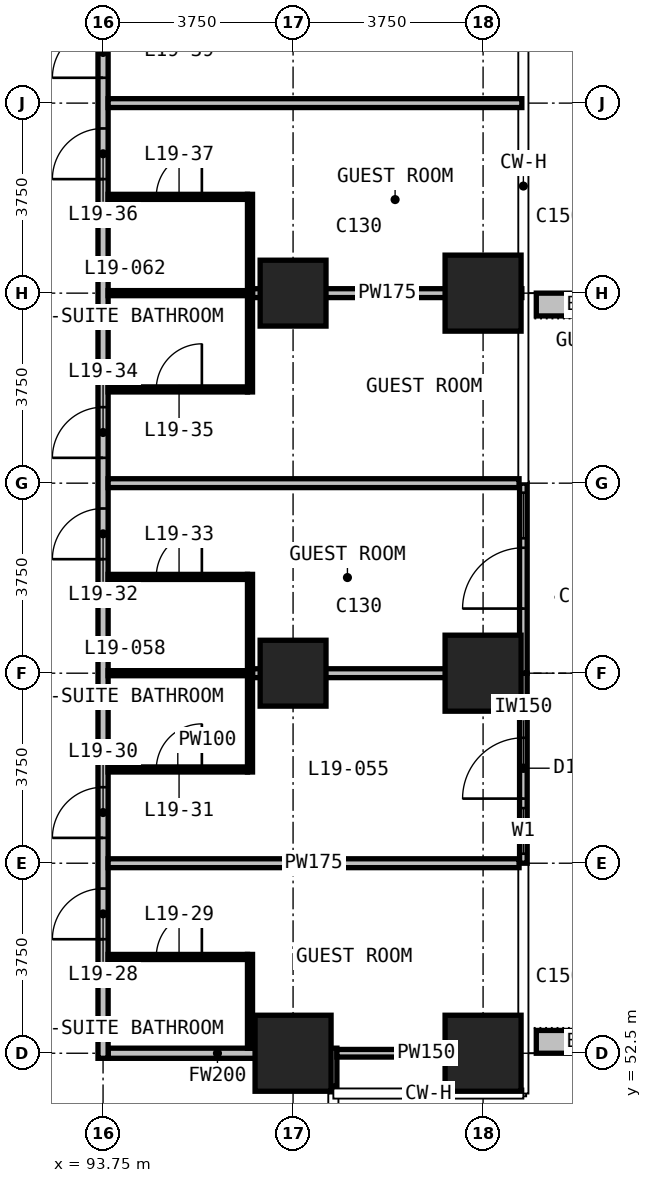
"""IFC4 building model, lengths in metres.
Left out: names, types, materials, properties, quantities, classifications, styles, units other than length and angle.
Written with IfcOpenShell. Run it as: python <this file> out.ifc"""

import sys

from ifc_helpers import new_model, si_unit, direction, frame, frame_2d, origin, origin_2d, place, context, subcontext, project, spatial, rectangle, extrude, element, fill, save


model = new_model("IFC4")
c1 = context("Model", 3, precision=1e-05, world=origin(), true_north=direction((0.0, 1.0)))
c2 = subcontext(c1, "Body", "Model", "MODEL_VIEW")
j1 = project(units=[si_unit("LENGTHUNIT", "METRE"), si_unit("PLANEANGLEUNIT", "RADIAN")], contexts=[c1])
p1 = place(None, origin())
s1 = spatial("IfcSite", under=j1, at=p1, CompositionType="ELEMENT")
p2 = place(p1, origin())
s2 = spatial("IfcBuilding", under=s1, at=p2, CompositionType="ELEMENT")
p3 = place(p2, frame((0.0, 0.0, 82.4)))
s3 = spatial("IfcBuildingStorey", under=s2, at=p3, CompositionType="ELEMENT", Elevation=82.4)
p4 = place(p3, frame((97.5, 52.5, 0.0), z_axis=(0.0, 0.0, 1.0), x_axis=(1.0, 0.0, 0.0)))
e1 = element("IfcColumn", 1, at=p4, inside=s3, PredefinedType="COLUMN", context=c2, shape_type="SweptSolid", body=[
    extrude(rectangle(XDim=1.5, YDim=1.5, at=origin_2d()), origin(), (0.0, 0.0, 1.0), 3.3),
])
for number, where, z_axis, x_axis in (
    (2, (97.5, 60.0, 0.0), (0.0, 0.0, 1.0), (1.0, 0.0, 0.0)),
    (3, (97.5, 67.5, 0.0), (0.0, 0.0, 1.0), (1.0, 0.0, 0.0)),
):
    element("IfcColumn", number, at=place(p3, frame(where, z_axis=z_axis, x_axis=x_axis)), inside=s3, PredefinedType="COLUMN", context=c2, shape_type="SweptSolid", body=[
        extrude(rectangle(XDim=1.3, YDim=1.3, at=origin_2d()), origin(), (0.0, 0.0, 1.0), 3.3),
    ])
for number, where, z_axis, x_axis in (
    (4, (101.25, 52.5, 0.0), (0.0, 0.0, 1.0), (1.0, 0.0, 0.0)),
    (5, (101.25, 60.0, 0.0), (0.0, 0.0, 1.0), (1.0, 0.0, 0.0)),
    (6, (101.25, 67.5, 0.0), (0.0, 0.0, 1.0), (1.0, 0.0, 0.0)),
):
    element("IfcColumn", number, at=place(p3, frame(where, z_axis=z_axis, x_axis=x_axis)), inside=s3, PredefinedType="COLUMN", context=c2, shape_type="SweptSolid", body=[
        extrude(rectangle(XDim=1.5, YDim=1.5, at=origin_2d()), origin(), (0.0, 0.0, 1.0), 3.3),
    ])
p5 = place(p3, frame((102.045, 56.25, 0.0), z_axis=(0.0, 0.0, 1.0), x_axis=(0.0, 1.0, 0.0)))
e7 = element("IfcWall", 7, at=p5, inside=s3, PredefinedType="SOLIDWALL", context=c2, shape_type="SweptSolid", body=[
    extrude(rectangle(XDim=3.75, YDim=0.15, at=frame_2d((1.875, 0.0))), origin(), (0.0, 0.0, 1.0), 3.0),
])
p6 = place(p5, frame((0.188, 0.0, 0.1)))
e8 = element("IfcOpeningElement", 8, at=p6, cuts=e7, PredefinedType="OPENING", context=c2, shape_type="SweptSolid", body=[
    extrude(rectangle(XDim=0.9, YDim=2.4, at=frame_2d((0.45, 1.2))), frame((0.0, 0.085, 0.0), z_axis=(0.0, -1.0, 0.0), x_axis=(1.0, 0.0, 0.0)), (0.0, 0.0, 1.0), 0.17),
])
p7 = place(p5, frame((1.275, 0.0, 0.0)))
e9 = element("IfcOpeningElement", 9, at=p7, cuts=e7, PredefinedType="OPENING", context=c2, shape_type="SweptSolid", body=[
    extrude(rectangle(XDim=1.2, YDim=2.4, at=frame_2d((0.6, 1.2))), frame((0.0, 0.085, 0.0), z_axis=(0.0, -1.0, 0.0), x_axis=(1.0, 0.0, 0.0)), (0.0, 0.0, 1.0), 0.17),
])
p8 = place(p3, frame((102.045, 60.0, 0.0), z_axis=(0.0, 0.0, 1.0), x_axis=(0.0, 1.0, 0.0)))
e10 = element("IfcWall", 10, at=p8, inside=s3, PredefinedType="SOLIDWALL", context=c2, shape_type="SweptSolid", body=[
    extrude(rectangle(XDim=3.75, YDim=0.15, at=frame_2d((1.875, 0.0))), origin(), (0.0, 0.0, 1.0), 3.0),
])
p9 = place(p8, frame((1.275, 0.0, 0.0)))
e11 = element("IfcOpeningElement", 11, at=p9, cuts=e10, PredefinedType="OPENING", context=c2, shape_type="SweptSolid", body=[
    extrude(rectangle(XDim=1.2, YDim=2.4, at=frame_2d((0.6, 1.2))), frame((0.0, 0.085, 0.0), z_axis=(0.0, -1.0, 0.0), x_axis=(1.0, 0.0, 0.0)), (0.0, 0.0, 1.0), 0.17),
])
p10 = place(p8, frame((2.663, 0.0, 0.1)))
e12 = element("IfcOpeningElement", 12, at=p10, cuts=e10, PredefinedType="OPENING", context=c2, shape_type="SweptSolid", body=[
    extrude(rectangle(XDim=0.9, YDim=2.4, at=frame_2d((0.45, 1.2))), frame((0.0, 0.085, 0.0), z_axis=(0.0, -1.0, 0.0), x_axis=(1.0, 0.0, 0.0)), (0.0, 0.0, 1.0), 0.17),
])
for number, where, z_axis, x_axis in (
    (13, (102.3, 52.725, 0.0), (0.0, 0.0, 1.0), (1.0, 0.0, 0.0)),
    (14, (102.3, 67.275, 0.0), (0.0, 0.0, 1.0), (1.0, 0.0, 0.0)),
):
    element("IfcWall", number, at=place(p3, frame(where, z_axis=z_axis, x_axis=x_axis)), inside=s3, PredefinedType="USERDEFINED", context=c2, shape_type="SweptSolid", body=[
        extrude(rectangle(XDim=2.35, YDim=0.45, at=frame_2d((1.175, 0.0))), origin(), (0.0, 0.0, 1.0), 1.1),
    ])
p11 = place(p3, frame((93.85, 52.5, 0.0), z_axis=(0.0, 0.0, 1.0), x_axis=(1.0, 0.0, 0.0)))
e15 = element("IfcWall", 15, at=p11, inside=s3, PredefinedType="PARTITIONING", context=c2, shape_type="SweptSolid", body=[
    extrude(rectangle(XDim=4.315, YDim=0.2, at=frame_2d((2.157, 0.0))), origin(), (0.0, 0.0, 1.0), 3.0),
])
p12 = place(p3, frame((93.75, 52.4, 0.0), z_axis=(0.0, 0.0, 1.0), x_axis=(0.0, 1.0, 0.0)))
e16 = element("IfcWall", 16, at=p12, inside=s3, PredefinedType="PARTITIONING", context=c2, shape_type="SweptSolid", body=[
    extrude(rectangle(XDim=33.925, YDim=0.2, at=frame_2d((16.962, 0.0))), origin(), (0.0, 0.0, 1.0), 3.0),
])
p13 = place(p12, frame((2.35, 0.0, 0.0)))
e17 = element("IfcOpeningElement", 17, at=p13, cuts=e16, PredefinedType="OPENING", context=c2, shape_type="SweptSolid", body=[
    extrude(rectangle(XDim=1.0, YDim=2.2, at=frame_2d((0.5, 1.1))), frame((0.0, 0.11, 0.0), z_axis=(0.0, -1.0, 0.0), x_axis=(1.0, 0.0, 0.0)), (0.0, 0.0, 1.0), 0.22),
])
p14 = place(p12, frame((4.35, 0.0, 0.0)))
e18 = element("IfcOpeningElement", 18, at=p14, cuts=e16, PredefinedType="OPENING", context=c2, shape_type="SweptSolid", body=[
    extrude(rectangle(XDim=1.0, YDim=2.2, at=frame_2d((0.5, 1.1))), frame((0.0, 0.11, 0.0), z_axis=(0.0, -1.0, 0.0), x_axis=(1.0, 0.0, 0.0)), (0.0, 0.0, 1.0), 0.22),
])
p15 = place(p12, frame((9.85, 0.0, 0.0)))
e19 = element("IfcOpeningElement", 19, at=p15, cuts=e16, PredefinedType="OPENING", context=c2, shape_type="SweptSolid", body=[
    extrude(rectangle(XDim=1.0, YDim=2.2, at=frame_2d((0.5, 1.1))), frame((0.0, 0.11, 0.0), z_axis=(0.0, -1.0, 0.0), x_axis=(1.0, 0.0, 0.0)), (0.0, 0.0, 1.0), 0.22),
])
p16 = place(p12, frame((11.85, 0.0, 0.0)))
e20 = element("IfcOpeningElement", 20, at=p16, cuts=e16, PredefinedType="OPENING", context=c2, shape_type="SweptSolid", body=[
    extrude(rectangle(XDim=1.0, YDim=2.2, at=frame_2d((0.5, 1.1))), frame((0.0, 0.11, 0.0), z_axis=(0.0, -1.0, 0.0), x_axis=(1.0, 0.0, 0.0)), (0.0, 0.0, 1.0), 0.22),
])
p17 = place(p12, frame((17.35, 0.0, 0.0)))
e21 = element("IfcOpeningElement", 21, at=p17, cuts=e16, PredefinedType="OPENING", context=c2, shape_type="SweptSolid", body=[
    extrude(rectangle(XDim=1.0, YDim=2.2, at=frame_2d((0.5, 1.1))), frame((0.0, 0.11, 0.0), z_axis=(0.0, -1.0, 0.0), x_axis=(1.0, 0.0, 0.0)), (0.0, 0.0, 1.0), 0.22),
])
p18 = place(p12, frame((19.35, 0.0, 0.0)))
e22 = element("IfcOpeningElement", 22, at=p18, cuts=e16, PredefinedType="OPENING", context=c2, shape_type="SweptSolid", body=[
    extrude(rectangle(XDim=1.0, YDim=2.2, at=frame_2d((0.5, 1.1))), frame((0.0, 0.11, 0.0), z_axis=(0.0, -1.0, 0.0), x_axis=(1.0, 0.0, 0.0)), (0.0, 0.0, 1.0), 0.22),
])
p19 = place(p12, frame((24.85, 0.0, 0.0)))
e23 = element("IfcOpeningElement", 23, at=p19, cuts=e16, PredefinedType="OPENING", context=c2, shape_type="SweptSolid", body=[
    extrude(rectangle(XDim=1.0, YDim=2.2, at=frame_2d((0.5, 1.1))), frame((0.0, 0.11, 0.0), z_axis=(0.0, -1.0, 0.0), x_axis=(1.0, 0.0, 0.0)), (0.0, 0.0, 1.0), 0.22),
])
p20 = place(p12, frame((26.85, 0.0, 0.0)))
e24 = element("IfcOpeningElement", 24, at=p20, cuts=e16, PredefinedType="OPENING", context=c2, shape_type="SweptSolid", body=[
    extrude(rectangle(XDim=1.0, YDim=2.2, at=frame_2d((0.5, 1.1))), frame((0.0, 0.11, 0.0), z_axis=(0.0, -1.0, 0.0), x_axis=(1.0, 0.0, 0.0)), (0.0, 0.0, 1.0), 0.22),
])
p21 = place(p12, frame((31.55, 0.0, 0.0)))
e25 = element("IfcOpeningElement", 25, at=p21, cuts=e16, PredefinedType="OPENING", context=c2, shape_type="SweptSolid", body=[
    extrude(rectangle(XDim=0.9, YDim=2.2, at=frame_2d((0.45, 1.1))), frame((0.0, 0.11, 0.0), z_axis=(0.0, -1.0, 0.0), x_axis=(1.0, 0.0, 0.0)), (0.0, 0.0, 1.0), 0.22),
])
p22 = place(p3, frame((98.265, 51.855, 0.0), z_axis=(0.0, 0.0, 1.0), x_axis=(0.0, 1.0, 0.0)))
e26 = element("IfcWall", 26, at=p22, inside=s3, PredefinedType="PARTITIONING", context=c2, shape_type="SweptSolid", body=[
    extrude(rectangle(XDim=0.745, YDim=0.2, at=frame_2d((0.373, 0.0))), origin(), (0.0, 0.0, 1.0), 3.0),
])
p23 = place(p3, frame((93.85, 56.25, 0.0), z_axis=(0.0, 0.0, 1.0), x_axis=(1.0, 0.0, 0.0)))
e27 = element("IfcWall", 27, at=p23, inside=s3, PredefinedType="PARTITIONING", context=c2, shape_type="SweptSolid", body=[
    extrude(rectangle(XDim=8.11, YDim=0.175, at=frame_2d((4.055, 0.0))), origin(), (0.0, 0.0, 1.0), 3.0),
])
p24 = place(p3, frame((96.7, 60.0, 0.0), z_axis=(0.0, 0.0, 1.0), x_axis=(1.0, 0.0, 0.0)))
e28 = element("IfcWall", 28, at=p24, inside=s3, PredefinedType="PARTITIONING", context=c2, shape_type="SweptSolid", body=[
    extrude(rectangle(XDim=5.26, YDim=0.175, at=frame_2d((2.63, 0.0))), origin(), (0.0, 0.0, 1.0), 3.0),
])
p25 = place(p3, frame((93.85, 63.75, 0.0), z_axis=(0.0, 0.0, 1.0), x_axis=(1.0, 0.0, 0.0)))
e29 = element("IfcWall", 29, at=p25, inside=s3, PredefinedType="PARTITIONING", context=c2, shape_type="SweptSolid", body=[
    extrude(rectangle(XDim=8.11, YDim=0.175, at=frame_2d((4.055, 0.0))), origin(), (0.0, 0.0, 1.0), 3.0),
])
p26 = place(p3, frame((96.7, 67.5, 0.0), z_axis=(0.0, 0.0, 1.0), x_axis=(1.0, 0.0, 0.0)))
e30 = element("IfcWall", 30, at=p26, inside=s3, PredefinedType="PARTITIONING", context=c2, shape_type="SweptSolid", body=[
    extrude(rectangle(XDim=5.315, YDim=0.175, at=frame_2d((2.657, 0.0))), origin(), (0.0, 0.0, 1.0), 3.0),
])
p27 = place(p3, frame((93.85, 71.25, 0.0), z_axis=(0.0, 0.0, 1.0), x_axis=(1.0, 0.0, 0.0)))
e31 = element("IfcWall", 31, at=p27, inside=s3, PredefinedType="PARTITIONING", context=c2, shape_type="SweptSolid", body=[
    extrude(rectangle(XDim=8.165, YDim=0.175, at=frame_2d((4.083, 0.0))), origin(), (0.0, 0.0, 1.0), 3.0),
])
p28 = place(p3, frame((98.365, 52.5, 0.0), z_axis=(0.0, 0.0, 1.0), x_axis=(1.0, 0.0, 0.0)))
e32 = element("IfcWall", 32, at=p28, inside=s3, PredefinedType="PARTITIONING", context=c2, shape_type="SweptSolid", body=[
    extrude(rectangle(XDim=3.53, YDim=0.15, at=frame_2d((1.765, 0.0))), origin(), (0.0, 0.0, 1.0), 3.0),
])
p29 = place(p3, frame((93.85, 54.4, 0.0), z_axis=(0.0, 0.0, 1.0), x_axis=(1.0, 0.0, 0.0)))
e33 = element("IfcWall", 33, at=p29, inside=s3, PredefinedType="PARTITIONING", context=c2, shape_type="SweptSolid", body=[
    extrude(rectangle(XDim=2.75, YDim=0.1, at=frame_2d((1.375, 0.0))), origin(), (0.0, 0.0, 1.0), 3.0),
])
p30 = place(p29, frame((0.95, 0.0, 0.0)))
e34 = element("IfcOpeningElement", 34, at=p30, cuts=e33, PredefinedType="OPENING", context=c2, shape_type="SweptSolid", body=[
    extrude(rectangle(XDim=0.9, YDim=2.2, at=frame_2d((0.45, 1.1))), frame((0.0, 0.06, 0.0), z_axis=(0.0, -1.0, 0.0), x_axis=(1.0, 0.0, 0.0)), (0.0, 0.0, 1.0), 0.12),
])
p31 = place(p3, frame((93.85, 58.1, 0.0), z_axis=(0.0, 0.0, 1.0), x_axis=(1.0, 0.0, 0.0)))
e35 = element("IfcWall", 35, at=p31, inside=s3, PredefinedType="PARTITIONING", context=c2, shape_type="SweptSolid", body=[
    extrude(rectangle(XDim=2.75, YDim=0.1, at=frame_2d((1.375, 0.0))), origin(), (0.0, 0.0, 1.0), 3.0),
])
p32 = place(p31, frame((0.95, 0.0, 0.0)))
e36 = element("IfcOpeningElement", 36, at=p32, cuts=e35, PredefinedType="OPENING", context=c2, shape_type="SweptSolid", body=[
    extrude(rectangle(XDim=0.9, YDim=2.2, at=frame_2d((0.45, 1.1))), frame((0.0, 0.06, 0.0), z_axis=(0.0, -1.0, 0.0), x_axis=(1.0, 0.0, 0.0)), (0.0, 0.0, 1.0), 0.12),
])
p33 = place(p3, frame((93.85, 60.0, 0.0), z_axis=(0.0, 0.0, 1.0), x_axis=(1.0, 0.0, 0.0)))
e37 = element("IfcWall", 37, at=p33, inside=s3, PredefinedType="PARTITIONING", context=c2, shape_type="SweptSolid", body=[
    extrude(rectangle(XDim=2.75, YDim=0.1, at=frame_2d((1.375, 0.0))), origin(), (0.0, 0.0, 1.0), 3.0),
])
p34 = place(p3, frame((93.85, 61.9, 0.0), z_axis=(0.0, 0.0, 1.0), x_axis=(1.0, 0.0, 0.0)))
e38 = element("IfcWall", 38, at=p34, inside=s3, PredefinedType="PARTITIONING", context=c2, shape_type="SweptSolid", body=[
    extrude(rectangle(XDim=2.75, YDim=0.1, at=frame_2d((1.375, 0.0))), origin(), (0.0, 0.0, 1.0), 3.0),
])
p35 = place(p34, frame((0.95, 0.0, 0.0)))
e39 = element("IfcOpeningElement", 39, at=p35, cuts=e38, PredefinedType="OPENING", context=c2, shape_type="SweptSolid", body=[
    extrude(rectangle(XDim=0.9, YDim=2.2, at=frame_2d((0.45, 1.1))), frame((0.0, 0.06, 0.0), z_axis=(0.0, -1.0, 0.0), x_axis=(1.0, 0.0, 0.0)), (0.0, 0.0, 1.0), 0.12),
])
p36 = place(p3, frame((93.85, 65.6, 0.0), z_axis=(0.0, 0.0, 1.0), x_axis=(1.0, 0.0, 0.0)))
e40 = element("IfcWall", 40, at=p36, inside=s3, PredefinedType="PARTITIONING", context=c2, shape_type="SweptSolid", body=[
    extrude(rectangle(XDim=2.75, YDim=0.1, at=frame_2d((1.375, 0.0))), origin(), (0.0, 0.0, 1.0), 3.0),
])
p37 = place(p36, frame((0.95, 0.0, 0.0)))
e41 = element("IfcOpeningElement", 41, at=p37, cuts=e40, PredefinedType="OPENING", context=c2, shape_type="SweptSolid", body=[
    extrude(rectangle(XDim=0.9, YDim=2.2, at=frame_2d((0.45, 1.1))), frame((0.0, 0.06, 0.0), z_axis=(0.0, -1.0, 0.0), x_axis=(1.0, 0.0, 0.0)), (0.0, 0.0, 1.0), 0.12),
])
p38 = place(p3, frame((93.85, 67.5, 0.0), z_axis=(0.0, 0.0, 1.0), x_axis=(1.0, 0.0, 0.0)))
e42 = element("IfcWall", 42, at=p38, inside=s3, PredefinedType="PARTITIONING", context=c2, shape_type="SweptSolid", body=[
    extrude(rectangle(XDim=2.75, YDim=0.1, at=frame_2d((1.375, 0.0))), origin(), (0.0, 0.0, 1.0), 3.0),
])
p39 = place(p3, frame((93.85, 69.4, 0.0), z_axis=(0.0, 0.0, 1.0), x_axis=(1.0, 0.0, 0.0)))
e43 = element("IfcWall", 43, at=p39, inside=s3, PredefinedType="PARTITIONING", context=c2, shape_type="SweptSolid", body=[
    extrude(rectangle(XDim=2.75, YDim=0.1, at=frame_2d((1.375, 0.0))), origin(), (0.0, 0.0, 1.0), 3.0),
])
p40 = place(p39, frame((0.95, 0.0, 0.0)))
e44 = element("IfcOpeningElement", 44, at=p40, cuts=e43, PredefinedType="OPENING", context=c2, shape_type="SweptSolid", body=[
    extrude(rectangle(XDim=0.9, YDim=2.2, at=frame_2d((0.45, 1.1))), frame((0.0, 0.06, 0.0), z_axis=(0.0, -1.0, 0.0), x_axis=(1.0, 0.0, 0.0)), (0.0, 0.0, 1.0), 0.12),
])
p41 = place(p3, frame((96.65, 52.6, 0.0), z_axis=(0.0, 0.0, 1.0), x_axis=(0.0, 1.0, 0.0)))
e45 = element("IfcWall", 45, at=p41, inside=s3, PredefinedType="PARTITIONING", context=c2, shape_type="SweptSolid", body=[
    extrude(rectangle(XDim=1.85, YDim=0.1, at=frame_2d((0.925, 0.0))), origin(), (0.0, 0.0, 1.0), 3.0),
])
for number, where, z_axis, x_axis in (
    (46, (96.65, 58.05, 0.0), (0.0, 0.0, 1.0), (0.0, 1.0, 0.0)),
    (47, (96.65, 65.55, 0.0), (0.0, 0.0, 1.0), (0.0, 1.0, 0.0)),
):
    element("IfcWall", number, at=place(p3, frame(where, z_axis=z_axis, x_axis=x_axis)), inside=s3, PredefinedType="PARTITIONING", context=c2, shape_type="SweptSolid", body=[
        extrude(rectangle(XDim=3.9, YDim=0.1, at=frame_2d((1.95, 0.0))), origin(), (0.0, 0.0, 1.0), 3.0),
    ])
p42 = place(p6, origin())
e48 = element("IfcWindow", 48, at=p42, inside=s3, PartitioningType="SINGLE_PANEL", PredefinedType="WINDOW", context=c2, shape_type="SweptSolid", body=[
    extrude(rectangle(XDim=0.9, YDim=2.4, at=frame_2d((0.45, 1.2))), frame((0.0, 0.03, 0.0), z_axis=(0.0, -1.0, 0.0), x_axis=(1.0, 0.0, 0.0)), (0.0, 0.0, 1.0), 0.06),
])
fill(e8, e48)
p43 = place(p7, origin())
e49 = element("IfcDoor", 49, at=p43, inside=s3, OperationType="SINGLE_SWING_LEFT", PredefinedType="DOOR", context=c2, shape_type="SweptSolid", body=[
    extrude(rectangle(XDim=1.2, YDim=2.4, at=frame_2d((0.6, 1.2))), frame((0.0, 0.025, 0.0), z_axis=(0.0, -1.0, 0.0), x_axis=(1.0, 0.0, 0.0)), (0.0, 0.0, 1.0), 0.05),
])
fill(e9, e49)
p44 = place(p9, origin())
e50 = element("IfcDoor", 50, at=p44, inside=s3, OperationType="SINGLE_SWING_LEFT", PredefinedType="DOOR", context=c2, shape_type="SweptSolid", body=[
    extrude(rectangle(XDim=1.2, YDim=2.4, at=frame_2d((0.6, 1.2))), frame((0.0, 0.025, 0.0), z_axis=(0.0, -1.0, 0.0), x_axis=(1.0, 0.0, 0.0)), (0.0, 0.0, 1.0), 0.05),
])
fill(e11, e50)
p45 = place(p10, origin())
e51 = element("IfcWindow", 51, at=p45, inside=s3, PartitioningType="SINGLE_PANEL", PredefinedType="WINDOW", context=c2, shape_type="SweptSolid", body=[
    extrude(rectangle(XDim=0.9, YDim=2.4, at=frame_2d((0.45, 1.2))), frame((0.0, 0.03, 0.0), z_axis=(0.0, -1.0, 0.0), x_axis=(1.0, 0.0, 0.0)), (0.0, 0.0, 1.0), 0.06),
])
fill(e12, e51)
p46 = place(p13, origin())
e52 = element("IfcDoor", 52, at=p46, inside=s3, OperationType="SINGLE_SWING_LEFT", PredefinedType="DOOR", context=c2, shape_type="SweptSolid", body=[
    extrude(rectangle(XDim=1.0, YDim=2.2, at=frame_2d((0.5, 1.1))), frame((0.0, 0.025, 0.0), z_axis=(0.0, -1.0, 0.0), x_axis=(1.0, 0.0, 0.0)), (0.0, 0.0, 1.0), 0.05),
])
fill(e17, e52)
p47 = place(p30, origin())
e53 = element("IfcDoor", 53, at=p47, inside=s3, OperationType="SINGLE_SWING_RIGHT", PredefinedType="DOOR", context=c2, shape_type="SweptSolid", body=[
    extrude(rectangle(XDim=0.9, YDim=2.2, at=frame_2d((0.45, 1.1))), frame((0.0, 0.025, 0.0), z_axis=(0.0, -1.0, 0.0), x_axis=(1.0, 0.0, 0.0)), (0.0, 0.0, 1.0), 0.05),
])
fill(e34, e53)
p48 = place(p14, origin())
e54 = element("IfcDoor", 54, at=p48, inside=s3, OperationType="SINGLE_SWING_LEFT", PredefinedType="DOOR", context=c2, shape_type="SweptSolid", body=[
    extrude(rectangle(XDim=1.0, YDim=2.2, at=frame_2d((0.5, 1.1))), frame((0.0, 0.025, 0.0), z_axis=(0.0, -1.0, 0.0), x_axis=(1.0, 0.0, 0.0)), (0.0, 0.0, 1.0), 0.05),
])
fill(e18, e54)
p49 = place(p32, origin())
e55 = element("IfcDoor", 55, at=p49, inside=s3, OperationType="SINGLE_SWING_RIGHT", PredefinedType="DOOR", context=c2, shape_type="SweptSolid", body=[
    extrude(rectangle(XDim=0.9, YDim=2.2, at=frame_2d((0.45, 1.1))), frame((0.0, 0.025, 0.0), z_axis=(0.0, -1.0, 0.0), x_axis=(1.0, 0.0, 0.0)), (0.0, 0.0, 1.0), 0.05),
])
fill(e36, e55)
p50 = place(p15, origin())
e56 = element("IfcDoor", 56, at=p50, inside=s3, OperationType="SINGLE_SWING_LEFT", PredefinedType="DOOR", context=c2, shape_type="SweptSolid", body=[
    extrude(rectangle(XDim=1.0, YDim=2.2, at=frame_2d((0.5, 1.1))), frame((0.0, 0.025, 0.0), z_axis=(0.0, -1.0, 0.0), x_axis=(1.0, 0.0, 0.0)), (0.0, 0.0, 1.0), 0.05),
])
fill(e19, e56)
p51 = place(p35, origin())
e57 = element("IfcDoor", 57, at=p51, inside=s3, OperationType="SINGLE_SWING_RIGHT", PredefinedType="DOOR", context=c2, shape_type="SweptSolid", body=[
    extrude(rectangle(XDim=0.9, YDim=2.2, at=frame_2d((0.45, 1.1))), frame((0.0, 0.025, 0.0), z_axis=(0.0, -1.0, 0.0), x_axis=(1.0, 0.0, 0.0)), (0.0, 0.0, 1.0), 0.05),
])
fill(e39, e57)
p52 = place(p16, origin())
e58 = element("IfcDoor", 58, at=p52, inside=s3, OperationType="SINGLE_SWING_LEFT", PredefinedType="DOOR", context=c2, shape_type="SweptSolid", body=[
    extrude(rectangle(XDim=1.0, YDim=2.2, at=frame_2d((0.5, 1.1))), frame((0.0, 0.025, 0.0), z_axis=(0.0, -1.0, 0.0), x_axis=(1.0, 0.0, 0.0)), (0.0, 0.0, 1.0), 0.05),
])
fill(e20, e58)
p53 = place(p37, origin())
e59 = element("IfcDoor", 59, at=p53, inside=s3, OperationType="SINGLE_SWING_RIGHT", PredefinedType="DOOR", context=c2, shape_type="SweptSolid", body=[
    extrude(rectangle(XDim=0.9, YDim=2.2, at=frame_2d((0.45, 1.1))), frame((0.0, 0.025, 0.0), z_axis=(0.0, -1.0, 0.0), x_axis=(1.0, 0.0, 0.0)), (0.0, 0.0, 1.0), 0.05),
])
fill(e41, e59)
p54 = place(p17, origin())
e60 = element("IfcDoor", 60, at=p54, inside=s3, OperationType="SINGLE_SWING_LEFT", PredefinedType="DOOR", context=c2, shape_type="SweptSolid", body=[
    extrude(rectangle(XDim=1.0, YDim=2.2, at=frame_2d((0.5, 1.1))), frame((0.0, 0.025, 0.0), z_axis=(0.0, -1.0, 0.0), x_axis=(1.0, 0.0, 0.0)), (0.0, 0.0, 1.0), 0.05),
])
fill(e21, e60)
p55 = place(p40, origin())
e61 = element("IfcDoor", 61, at=p55, inside=s3, OperationType="SINGLE_SWING_RIGHT", PredefinedType="DOOR", context=c2, shape_type="SweptSolid", body=[
    extrude(rectangle(XDim=0.9, YDim=2.2, at=frame_2d((0.45, 1.1))), frame((0.0, 0.025, 0.0), z_axis=(0.0, -1.0, 0.0), x_axis=(1.0, 0.0, 0.0)), (0.0, 0.0, 1.0), 0.05),
])
fill(e44, e61)
p56 = place(p18, origin())
e62 = element("IfcDoor", 62, at=p56, inside=s3, OperationType="SINGLE_SWING_RIGHT", PredefinedType="DOOR", context=c2, shape_type="SweptSolid", body=[
    extrude(rectangle(XDim=1.0, YDim=2.2, at=frame_2d((0.5, 1.1))), frame((0.0, 0.025, 0.0), z_axis=(0.0, -1.0, 0.0), x_axis=(1.0, 0.0, 0.0)), (0.0, 0.0, 1.0), 0.05),
])
fill(e22, e62)
save(model, sys.argv[1])
